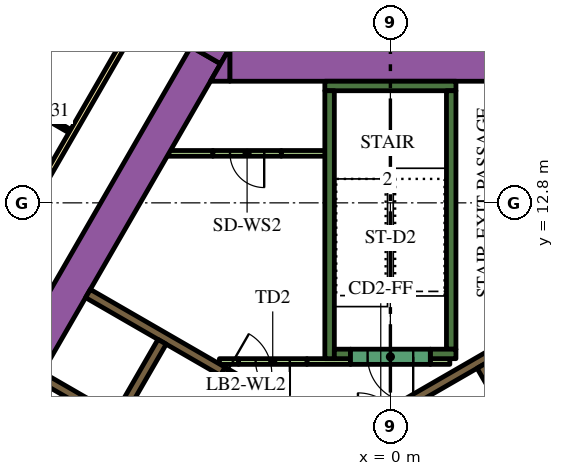
"""IFC4 building model, lengths in metres.
Left out: names, types, materials, properties, quantities, classifications, styles, units other than length and angle.
Written with IfcOpenShell. Run it as: python <this file> out.ifc"""

import sys

from ifc_helpers import new_model, si_unit, direction, frame, frame_2d, origin, place, context, subcontext, project, spatial, polyline, rectangle, outline, extrude, element, fill, save


model = new_model("IFC4")
c1 = context("Model", 3, precision=1e-05, world=origin(), true_north=direction((0.0, 1.0)))
c2 = subcontext(c1, "Body", "Model", "MODEL_VIEW")
j1 = project(units=[si_unit("LENGTHUNIT", "METRE"), si_unit("PLANEANGLEUNIT", "RADIAN")], contexts=[c1])
p1 = place(None, origin())
s1 = spatial("IfcSite", under=j1, at=p1, CompositionType="ELEMENT")
p2 = place(p1, origin())
s2 = spatial("IfcBuilding", under=s1, at=p2, CompositionType="ELEMENT")
p3 = place(p2, frame((0.0, 0.0, 74.4)))
s3 = spatial("IfcBuildingStorey", under=s2, at=p3, CompositionType="ELEMENT", Elevation=74.4)
p4 = place(p3, frame((-15.36, -1.503, 0.0), z_axis=(0.0, 0.0, 1.0), x_axis=(0.50000389221, 0.866023156604, 0.0)))
e1 = element("IfcWall", 1, at=p4, inside=s3, PredefinedType="SOLIDWALL", context=c2, shape_type="SweptSolid", body=[
    extrude(rectangle(XDim=21.0, YDim=0.9, at=frame_2d((10.5, 0.0))), origin(), (0.0, 0.0, 1.0), 3.9),
])
p5 = place(p3, origin())
e2 = element("IfcWall", 2, at=p5, inside=s3, PredefinedType="SOLIDWALL", context=c2, shape_type="SweptSolid", body=[
    extrude(outline(polyline([(-4.215, 16.9), (-4.469, 16.46), (-5.231, 16.9), (-4.215, 16.9)])), origin(), (0.0, 0.0, 1.0), 3.9),
])
p6 = place(p3, frame((-4.224, 16.45, 0.0), z_axis=(0.0, 0.0, 1.0), x_axis=(1.0, 0.0, 0.0)))
e3 = element("IfcWall", 3, at=p6, inside=s3, PredefinedType="SOLIDWALL", context=c2, shape_type="SweptSolid", body=[
    extrude(rectangle(XDim=9.488, YDim=0.9, at=frame_2d((4.744, 0.0))), origin(), (0.0, 0.0, 1.0), 3.9),
])
e4 = element("IfcWall", 4, at=p5, inside=s3, PredefinedType="SOLIDWALL", context=c2, shape_type="SweptSolid", body=[
    extrude(outline(polyline([(-4.734, 16.0), (-4.226, 16.88), (-4.226, 16.0), (-4.734, 16.0)])), origin(), (0.0, 0.0, 1.0), 3.9),
])
p7 = place(p3, frame((-1.725, 15.875, 0.0), z_axis=(0.0, 0.0, 1.0), x_axis=(1.0, 0.0, 0.0)))
e5 = element("IfcWall", 5, at=p7, inside=s3, PredefinedType="SOLIDWALL", context=c2, shape_type="SweptSolid", body=[
    extrude(rectangle(XDim=3.45, YDim=0.25, at=frame_2d((1.725, 0.0))), origin(), (0.0, 0.0, 1.0), 3.9),
])
p8 = place(p3, frame((1.6, 8.95, 0.0), z_axis=(0.0, 0.0, 1.0), x_axis=(0.0, 1.0, 0.0)))
e6 = element("IfcWall", 6, at=p8, inside=s3, PredefinedType="SOLIDWALL", context=c2, shape_type="SweptSolid", body=[
    extrude(rectangle(XDim=6.8, YDim=0.25, at=frame_2d((3.4, 0.0))), origin(), (0.0, 0.0, 1.0), 3.9),
])
p9 = place(p3, frame((1.05, 8.825, 0.0), z_axis=(0.0, 0.0, 1.0), x_axis=(1.0, 0.0, 0.0)))
e7 = element("IfcWall", 7, at=p9, inside=s3, PredefinedType="SOLIDWALL", context=c2, shape_type="SweptSolid", body=[
    extrude(rectangle(XDim=0.675, YDim=0.25, at=frame_2d((0.337, 0.0))), origin(), (0.0, 0.0, 1.0), 3.9),
])
p10 = place(p3, frame((-1.6, 8.7, 0.0), z_axis=(0.0, 0.0, 1.0), x_axis=(0.0, 1.0, 0.0)))
e8 = element("IfcWall", 8, at=p10, inside=s3, PredefinedType="SOLIDWALL", context=c2, shape_type="SweptSolid", body=[
    extrude(rectangle(XDim=7.05, YDim=0.25, at=frame_2d((3.525, 0.0))), origin(), (0.0, 0.0, 1.0), 3.9),
])
p11 = place(p3, frame((-1.475, 8.825, 0.0), z_axis=(0.0, 0.0, 1.0), x_axis=(1.0, 0.0, 0.0)))
e9 = element("IfcWall", 9, at=p11, inside=s3, PredefinedType="SOLIDWALL", context=c2, shape_type="SweptSolid", body=[
    extrude(rectangle(XDim=0.425, YDim=0.25, at=frame_2d((0.212, 0.0))), origin(), (0.0, 0.0, 1.0), 3.9),
])
p12 = place(p3, frame((0.098, 7.331, 0.0), z_axis=(0.0, 0.0, 1.0), x_axis=(0.865988154826, 0.50006451154, 0.0)))
e10 = element("IfcWall", 10, at=p12, inside=s3, PredefinedType="SOLIDWALL", context=c2, shape_type="SweptSolid", body=[
    extrude(rectangle(XDim=3.398, YDim=0.25, at=frame_2d((1.699, 0.0))), origin(), (0.0, 0.0, 1.0), 3.9),
])
e11 = element("IfcWall", 11, at=p5, inside=s3, PredefinedType="SOLIDWALL", context=c2, shape_type="SweptSolid", body=[
    extrude(outline(polyline([(-3.128, 7.481), (-3.259, 7.557), (-3.134, 7.773), (-3.003, 7.698), (-3.128, 7.481)])), origin(), (0.0, 0.0, 1.0), 3.9),
])
p13 = place(p3, frame((-7.314, 7.132, 0.0), z_axis=(0.0, 0.0, 1.0), x_axis=(-0.866008176907, 0.50002983664, 0.0)))
e12 = element("IfcWall", 12, at=p13, inside=s3, PredefinedType="SOLIDWALL", context=c2, shape_type="SweptSolid", body=[
    extrude(rectangle(XDim=2.2, YDim=0.25, at=frame_2d((1.1, 0.0))), origin(), (0.0, 0.0, 1.0), 3.9),
])
p14 = place(p3, frame((-7.959, 10.415, 0.0), z_axis=(0.0, 0.0, 1.0), x_axis=(0.866020958405, -0.500007699544, 0.0)))
e13 = element("IfcWall", 13, at=p14, inside=s3, PredefinedType="SOLIDWALL", context=c2, shape_type="SweptSolid", body=[
    extrude(rectangle(XDim=4.1, YDim=0.25, at=frame_2d((2.05, 0.0))), origin(), (0.0, 0.0, 1.0), 3.9),
])
p15 = place(p3, frame((-3.997, 8.625, 0.0), z_axis=(0.0, 0.0, 1.0), x_axis=(-1.0, 0.0, 0.0)))
e14 = element("IfcWall", 14, at=p15, inside=s3, PredefinedType="PARTITIONING", context=c2, shape_type="SweptSolid", body=[
    extrude(rectangle(XDim=0.502, YDim=0.15, at=frame_2d((0.251, 0.0))), origin(), (0.0, 0.0, 1.0), 2.7),
])
p16 = place(p3, frame((-5.851, 14.102, 0.0), z_axis=(0.0, 0.0, 1.0), x_axis=(1.0, 0.0, 0.0)))
e15 = element("IfcWall", 15, at=p16, inside=s3, PredefinedType="PARTITIONING", context=c2, shape_type="SweptSolid", body=[
    extrude(rectangle(XDim=1.18, YDim=0.15, at=frame_2d((0.59, 0.0))), origin(), (0.0, 0.0, 1.0), 2.7),
])
p17 = place(p3, frame((-2.871, 14.102, 0.0), z_axis=(0.0, 0.0, 1.0), x_axis=(1.0, 0.0, 0.0)))
e16 = element("IfcWall", 16, at=p17, inside=s3, PredefinedType="PARTITIONING", context=c2, shape_type="SweptSolid", body=[
    extrude(rectangle(XDim=1.196, YDim=0.15, at=frame_2d((0.598, 0.0))), origin(), (0.0, 0.0, 1.0), 2.7),
])
p18 = place(p3, frame((-2.196, 8.625, 0.0), z_axis=(0.0, 0.0, 1.0), x_axis=(1.0, 0.0, 0.0)))
e17 = element("IfcWall", 17, at=p18, inside=s3, PredefinedType="PARTITIONING", context=c2, shape_type="SweptSolid", body=[
    extrude(rectangle(XDim=1.146, YDim=0.15, at=frame_2d((0.573, 0.0))), origin(), (0.0, 0.0, 1.0), 2.7),
])
p19 = place(p3, frame((1.05, 8.625, 0.0), z_axis=(0.0, 0.0, 1.0), x_axis=(1.0, 0.0, 0.0)))
e18 = element("IfcWall", 18, at=p19, inside=s3, PredefinedType="PARTITIONING", context=c2, shape_type="SweptSolid", body=[
    extrude(rectangle(XDim=0.514, YDim=0.15, at=frame_2d((0.257, 0.0))), origin(), (0.0, 0.0, 1.0), 2.7),
])
p20 = place(p3, frame((8.565, -2.185, 0.0), z_axis=(0.0, 0.0, 1.0), x_axis=(-0.499997954832, 0.866026584559, 0.0)))
e19 = element("IfcWall", 19, at=p20, inside=s3, PredefinedType="SOLIDWALL", context=c2, shape_type="SweptSolid", body=[
    extrude(rectangle(XDim=12.35, YDim=0.25, at=frame_2d((6.175, 0.0))), origin(), (0.0, 0.0, 1.0), 3.9),
])
p21 = place(p20, frame((5.725, 0.0, 0.0)))
e20 = element("IfcOpeningElement", 20, at=p21, cuts=e19, PredefinedType="OPENING", context=c2, shape_type="SweptSolid", body=[
    extrude(rectangle(XDim=0.9, YDim=2.1, at=frame_2d((0.45, 1.05))), frame((0.0, 0.135, 0.0), z_axis=(0.0, -1.0, 0.0), x_axis=(1.0, 0.0, 0.0)), (0.0, 0.0, 1.0), 0.27),
])
p22 = place(p3, frame((-6.008, 9.144, 0.0), z_axis=(0.0, 0.0, 1.0), x_axis=(-0.500006956611, -0.866021387346, 0.0)))
e21 = element("IfcWall", 21, at=p22, inside=s3, PredefinedType="SOLIDWALL", context=c2, shape_type="SweptSolid", body=[
    extrude(rectangle(XDim=9.83, YDim=0.25, at=frame_2d((4.915, 0.0))), origin(), (0.0, 0.0, 1.0), 3.9),
])
p23 = place(p22, frame((6.985, 0.0, 0.0)))
e22 = element("IfcOpeningElement", 22, at=p23, cuts=e21, PredefinedType="OPENING", context=c2, shape_type="SweptSolid", body=[
    extrude(rectangle(XDim=0.9, YDim=2.1, at=frame_2d((0.45, 1.05))), frame((0.0, 0.135, 0.0), z_axis=(0.0, -1.0, 0.0), x_axis=(1.0, 0.0, 0.0)), (0.0, 0.0, 1.0), 0.27),
])
p24 = place(p3, frame((1.05, 8.75, 0.0), z_axis=(0.0, 0.0, 1.0), x_axis=(-1.0, 0.0, 0.0)))
e23 = element("IfcWall", 23, at=p24, inside=s3, PredefinedType="SOLIDWALL", context=c2, shape_type="SweptSolid", body=[
    extrude(rectangle(XDim=2.1, YDim=0.4, at=frame_2d((1.05, 0.0))), origin(), (0.0, 0.0, 1.0), 3.9),
])
p25 = place(p24, frame((0.45, 0.0, 0.0)))
e24 = element("IfcOpeningElement", 24, at=p25, cuts=e23, PredefinedType="OPENING", context=c2, shape_type="SweptSolid", body=[
    extrude(rectangle(XDim=1.2, YDim=2.1, at=frame_2d((0.6, 1.05))), frame((0.0, 0.21, 0.0), z_axis=(0.0, -1.0, 0.0), x_axis=(1.0, 0.0, 0.0)), (0.0, 0.0, 1.0), 0.42),
])
p26 = place(p3, frame((-2.196, 8.625, 0.0), z_axis=(0.0, 0.0, 1.0), x_axis=(-1.0, 0.0, 0.0)))
e25 = element("IfcWall", 25, at=p26, inside=s3, PredefinedType="PARTITIONING", context=c2, shape_type="SweptSolid", body=[
    extrude(rectangle(XDim=1.8, YDim=0.15, at=frame_2d((0.9, 0.0))), origin(), (0.0, 0.0, 1.0), 2.7),
])
p27 = place(p26, frame((0.45, 0.0, 0.0)))
e26 = element("IfcOpeningElement", 26, at=p27, cuts=e25, PredefinedType="OPENING", context=c2, shape_type="SweptSolid", body=[
    extrude(rectangle(XDim=0.9, YDim=2.1, at=frame_2d((0.45, 1.05))), frame((0.0, 0.085, 0.0), z_axis=(0.0, -1.0, 0.0), x_axis=(1.0, 0.0, 0.0)), (0.0, 0.0, 1.0), 0.17),
])
p28 = place(p3, frame((-4.409, 8.365, 0.0), z_axis=(0.0, 0.0, 1.0), x_axis=(0.866034573852, -0.49998411664, 0.0)))
e27 = element("IfcWall", 27, at=p28, inside=s3, PredefinedType="SOLIDWALL", context=c2, shape_type="SweptSolid", body=[
    extrude(rectangle(XDim=1.4, YDim=0.25, at=frame_2d((0.7, 0.0))), origin(), (0.0, 0.0, 1.0), 3.9),
])
p29 = place(p28, frame((0.1, 0.0, 0.0)))
e28 = element("IfcOpeningElement", 28, at=p29, cuts=e27, PredefinedType="OPENING", context=c2, shape_type="SweptSolid", body=[
    extrude(rectangle(XDim=1.2, YDim=2.1, at=frame_2d((0.6, 1.05))), frame((0.0, 0.135, 0.0), z_axis=(0.0, -1.0, 0.0), x_axis=(1.0, 0.0, 0.0)), (0.0, 0.0, 1.0), 0.27),
])
p30 = place(p3, frame((-2.871, 14.102, 0.0), z_axis=(0.0, 0.0, 1.0), x_axis=(-1.0, 0.0, 0.0)))
e29 = element("IfcWall", 29, at=p30, inside=s3, PredefinedType="PARTITIONING", context=c2, shape_type="SweptSolid", body=[
    extrude(rectangle(XDim=1.8, YDim=0.15, at=frame_2d((0.9, 0.0))), origin(), (0.0, 0.0, 1.0), 2.7),
])
p31 = place(p30, frame((0.45, 0.0, 0.0)))
e30 = element("IfcOpeningElement", 30, at=p31, cuts=e29, PredefinedType="OPENING", context=c2, shape_type="SweptSolid", body=[
    extrude(rectangle(XDim=0.9, YDim=2.1, at=frame_2d((0.45, 1.05))), frame((0.0, 0.085, 0.0), z_axis=(0.0, -1.0, 0.0), x_axis=(1.0, 0.0, 0.0)), (0.0, 0.0, 1.0), 0.17),
])
p32 = place(p3, frame((-19.081, -3.9, 0.0), z_axis=(0.0, 0.0, 1.0), x_axis=(0.499998313975, 0.866026377209, 0.0)))
e31 = element("IfcWall", 31, at=p32, inside=s3, PredefinedType="PARTITIONING", context=c2, shape_type="SweptSolid", body=[
    extrude(rectangle(XDim=25.766, YDim=0.15, at=frame_2d((12.883, 0.0))), origin(), (0.0, 0.0, 1.0), 2.7),
])
p33 = place(p32, frame((24.265, 0.0, 0.0)))
e32 = element("IfcOpeningElement", 32, at=p33, cuts=e31, PredefinedType="OPENING", context=c2, shape_type="SweptSolid", body=[
    extrude(rectangle(XDim=1.0, YDim=2.1, at=frame_2d((0.5, 1.05))), frame((0.0, 0.085, 0.0), z_axis=(0.0, -1.0, 0.0), x_axis=(1.0, 0.0, 0.0)), (0.0, 0.0, 1.0), 0.17),
])
p34 = place(p32, frame((13.146, 0.0, 0.0)))
e33 = element("IfcOpeningElement", 33, at=p34, cuts=e31, PredefinedType="OPENING", context=c2, shape_type="SweptSolid", body=[
    extrude(rectangle(XDim=1.1, YDim=2.1, at=frame_2d((0.55, 1.05))), frame((0.0, 0.085, 0.0), z_axis=(0.0, -1.0, 0.0), x_axis=(1.0, 0.0, 0.0)), (0.0, 0.0, 1.0), 0.17),
])
p35 = place(p32, frame((11.693, 0.0, 0.0)))
e34 = element("IfcOpeningElement", 34, at=p35, cuts=e31, PredefinedType="OPENING", context=c2, shape_type="SweptSolid", body=[
    extrude(rectangle(XDim=1.0, YDim=2.1, at=frame_2d((0.5, 1.05))), frame((0.0, 0.085, 0.0), z_axis=(0.0, -1.0, 0.0), x_axis=(1.0, 0.0, 0.0)), (0.0, 0.0, 1.0), 0.17),
])
p36 = place(p32, frame((0.18, 0.0, 0.0)))
e35 = element("IfcOpeningElement", 35, at=p36, cuts=e31, PredefinedType="OPENING", context=c2, shape_type="SweptSolid", body=[
    extrude(rectangle(XDim=1.0, YDim=2.1, at=frame_2d((0.5, 1.05))), frame((0.0, 0.085, 0.0), z_axis=(0.0, -1.0, 0.0), x_axis=(1.0, 0.0, 0.0)), (0.0, 0.0, 1.0), 0.17),
])
p37 = place(p3, frame((-8.437, 14.687, 0.0), z_axis=(0.0, 0.0, 1.0), x_axis=(-0.866019956843, 0.50000943426, 0.0)))
e36 = element("IfcWall", 36, at=p37, inside=s3, PredefinedType="PARTITIONING", context=c2, shape_type="SweptSolid", body=[
    extrude(rectangle(XDim=2.7, YDim=0.1, at=frame_2d((1.35, 0.0))), origin(), (0.0, 0.0, 1.0), 2.7),
])
p38 = place(p37, frame((0.6, 0.0, 0.0)))
e37 = element("IfcOpeningElement", 37, at=p38, cuts=e36, PredefinedType="OPENING", context=c2, shape_type="SweptSolid", body=[
    extrude(rectangle(XDim=0.9, YDim=2.1, at=frame_2d((0.45, 1.05))), frame((0.0, 0.06, 0.0), z_axis=(0.0, -1.0, 0.0), x_axis=(1.0, 0.0, 0.0)), (0.0, 0.0, 1.0), 0.12),
])
p39 = place(p25, origin())
e38 = element("IfcDoor", 38, at=p39, inside=s3, OperationType="SINGLE_SWING_LEFT", PredefinedType="DOOR", context=c2, shape_type="SweptSolid", body=[
    extrude(rectangle(XDim=1.2, YDim=2.1, at=frame_2d((0.6, 1.05))), frame((0.0, 0.025, 0.0), z_axis=(0.0, -1.0, 0.0), x_axis=(1.0, 0.0, 0.0)), (0.0, 0.0, 1.0), 0.05),
])
fill(e24, e38)
p40 = place(p27, origin())
e39 = element("IfcDoor", 39, at=p40, inside=s3, OperationType="SINGLE_SWING_LEFT", PredefinedType="DOOR", context=c2, shape_type="SweptSolid", body=[
    extrude(rectangle(XDim=0.9, YDim=2.1, at=frame_2d((0.45, 1.05))), frame((0.0, 0.025, 0.0), z_axis=(0.0, -1.0, 0.0), x_axis=(1.0, 0.0, 0.0)), (0.0, 0.0, 1.0), 0.05),
])
fill(e26, e39)
p41 = place(p29, origin())
e40 = element("IfcDoor", 40, at=p41, inside=s3, OperationType="SINGLE_SWING_LEFT", PredefinedType="DOOR", context=c2, shape_type="SweptSolid", body=[
    extrude(rectangle(XDim=1.2, YDim=2.1, at=frame_2d((0.6, 1.05))), frame((0.0, 0.025, 0.0), z_axis=(0.0, -1.0, 0.0), x_axis=(1.0, 0.0, 0.0)), (0.0, 0.0, 1.0), 0.05),
])
fill(e28, e40)
p42 = place(p31, origin())
e41 = element("IfcDoor", 41, at=p42, inside=s3, OperationType="SINGLE_SWING_LEFT", PredefinedType="DOOR", context=c2, shape_type="SweptSolid", body=[
    extrude(rectangle(XDim=0.9, YDim=2.1, at=frame_2d((0.45, 1.05))), frame((0.0, 0.025, 0.0), z_axis=(0.0, -1.0, 0.0), x_axis=(1.0, 0.0, 0.0)), (0.0, 0.0, 1.0), 0.05),
])
fill(e30, e41)
save(model, sys.argv[1])
